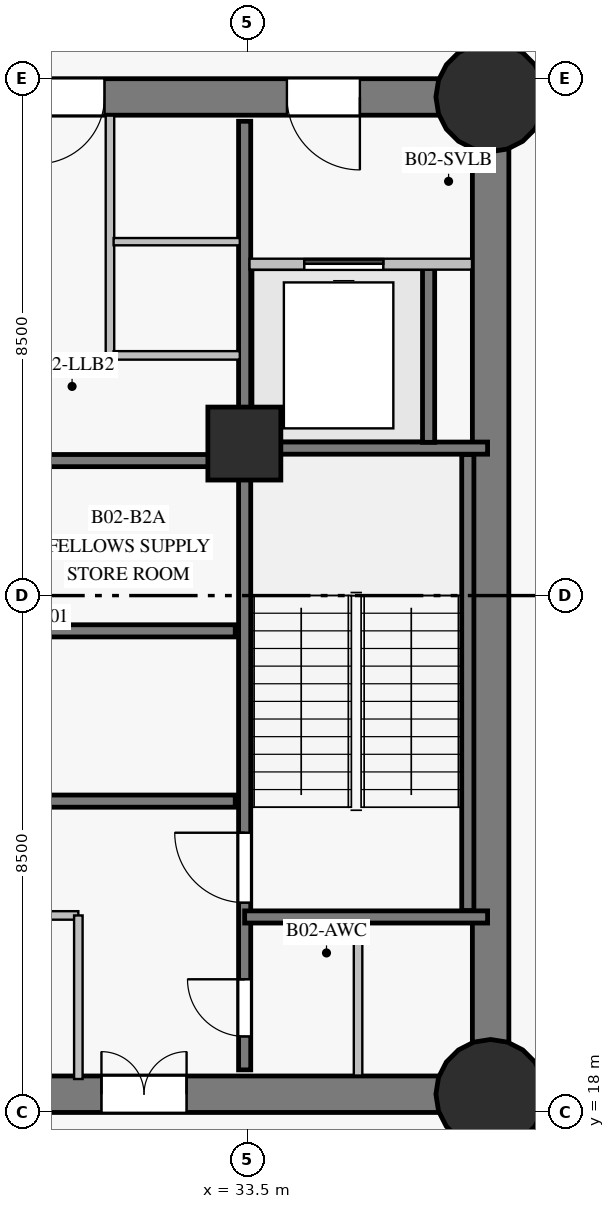
"""IFC4 building model, lengths in metres.
Left out: names, types, materials, properties, quantities, classifications, styles, units other than length and angle.
Written with IfcOpenShell. Run it as: python <this file> out.ifc"""

import sys

from ifc_helpers import new_model, si_unit, direction, frame, frame_2d, origin, origin_with_axes, origin_2d, place, context, subcontext, project, spatial, rectangle, circle, extrude, source, transform, mapped, element, fill, save


model = new_model("IFC4")
c1 = context("Model", 3, precision=1e-05, world=origin(), true_north=direction((0.0, 1.0)))
c2 = subcontext(c1, "Body", "Model", "MODEL_VIEW")
j1 = project(units=[si_unit("LENGTHUNIT", "METRE"), si_unit("PLANEANGLEUNIT", "RADIAN")], contexts=[c1])
p1 = place(None, origin())
s1 = spatial("IfcSite", under=j1, at=p1, CompositionType="ELEMENT")
p2 = place(p1, origin())
s2 = spatial("IfcBuilding", under=s1, at=p2, CompositionType="ELEMENT")
p3 = place(p2, frame((0.0, 0.0, -8.4)))
s3 = spatial("IfcBuildingStorey", under=s2, at=p3, CompositionType="ELEMENT", Elevation=-8.4)
p4 = place(p3, frame((26.55, 18.3, 0.0), z_axis=(0.0, 0.0, 1.0), x_axis=(1.0, 0.0, 0.0)))
e1 = element("IfcWall", 1, at=p4, inside=s3, PredefinedType="SHEAR", context=c2, shape_type="SweptSolid", body=[
    extrude(rectangle(XDim=10.95, YDim=0.6, at=frame_2d((5.475, 0.0))), origin(), (0.0, 0.0, 1.0), 3.85),
])
p5 = place(p4, frame((4.55, 0.0, 0.0)))
e2 = element("IfcOpeningElement", 2, at=p5, cuts=e1, PredefinedType="OPENING", context=c2, shape_type="SweptSolid", body=[
    extrude(rectangle(XDim=1.4, YDim=2.2, at=frame_2d((0.7, 1.1))), frame((0.0, 0.31, 0.0), z_axis=(0.0, -1.0, 0.0), x_axis=(1.0, 0.0, 0.0)), (0.0, 0.0, 1.0), 0.62),
])
p6 = place(p3, frame((37.5, 18.3, 0.0), z_axis=(0.0, 0.0, 1.0), x_axis=(0.0, 1.0, 0.0)))
e3 = element("IfcWall", 3, at=p6, inside=s3, PredefinedType="SHEAR", context=c2, shape_type="SweptSolid", body=[
    extrude(rectangle(XDim=16.4, YDim=0.6, at=frame_2d((8.2, 0.0))), origin(), (0.0, 0.0, 1.0), 3.85),
])
p7 = place(p3, frame((37.5, 34.7, 0.0), z_axis=(0.0, 0.0, 1.0), x_axis=(-1.0, 0.0, 0.0)))
e4 = element("IfcWall", 4, at=p7, inside=s3, PredefinedType="SHEAR", context=c2, shape_type="SweptSolid", body=[
    extrude(rectangle(XDim=10.95, YDim=0.6, at=frame_2d((5.475, 0.0))), origin(), (0.0, 0.0, 1.0), 3.85),
])
p8 = place(p7, frame((2.15, 0.0, 0.0)))
e5 = element("IfcOpeningElement", 5, at=p8, cuts=e4, PredefinedType="OPENING", context=c2, shape_type="SweptSolid", body=[
    extrude(rectangle(XDim=1.2, YDim=2.15, at=frame_2d((0.6, 1.075))), frame((0.0, 0.31, 0.0), z_axis=(0.0, -1.0, 0.0), x_axis=(1.0, 0.0, 0.0)), (0.0, 0.0, 1.0), 0.62),
])
p9 = place(p7, frame((6.35, 0.0, 0.0)))
e6 = element("IfcOpeningElement", 6, at=p9, cuts=e4, PredefinedType="OPENING", context=c2, shape_type="SweptSolid", body=[
    extrude(rectangle(XDim=1.1, YDim=2.15, at=frame_2d((0.55, 1.075))), frame((0.0, 0.31, 0.0), z_axis=(0.0, -1.0, 0.0), x_axis=(1.0, 0.0, 0.0)), (0.0, 0.0, 1.0), 0.62),
])
m1 = source(origin_with_axes(), c2, "Body", "SweptSolid", [
    extrude(circle(Radius=0.9, at=origin_2d()), origin(), (0.0, 0.0, 1.0), 4.2),
])
for number, where, z_axis, x_axis in (
    (7, (37.5, 18.3, 0.0), (0.0, 0.0, 1.0), (1.0, 0.0, 0.0)),
    (8, (37.5, 34.7, 0.0), (0.0, 0.0, 1.0), (1.0, 0.0, 0.0)),
):
    element("IfcColumn", number, at=place(p3, frame(where, z_axis=z_axis, x_axis=x_axis)), inside=s3, PredefinedType="COLUMN", context=c2, shape_type="MappedRepresentation", body=[
        mapped(m1, transform((0.0, 0.0, 0.0), scale=1.0)),
    ])
m2 = source(origin_with_axes(), c2, "Body", "SweptSolid", [
    extrude(rectangle(XDim=1.2, YDim=1.2, at=origin_2d()), origin(), (0.0, 0.0, 1.0), 4.2),
])
p10 = place(p3, frame((33.45, 29.0, 0.0), z_axis=(0.0, 0.0, 1.0), x_axis=(1.0, 0.0, 0.0)))
e9 = element("IfcColumn", 9, at=p10, inside=s3, PredefinedType="COLUMN", context=c2, shape_type="MappedRepresentation", body=[
    mapped(m2, transform((0.0, 0.0, 0.0), scale=1.0)),
])
p11 = place(p3, frame((33.455, 18.7, 0.0), z_axis=(0.0, 0.0, 1.0), x_axis=(0.0, 1.0, 0.0)))
e10 = element("IfcWall", 10, at=p11, inside=s3, PredefinedType="SHEAR", context=c2, shape_type="SweptSolid", body=[
    extrude(rectangle(XDim=15.6, YDim=0.2, at=frame_2d((7.8, 0.0))), origin(), (0.0, 0.0, 1.0), 3.85),
])
p12 = place(p11, frame((2.75, 0.0, 0.0)))
e11 = element("IfcOpeningElement", 11, at=p12, cuts=e10, PredefinedType="OPENING", context=c2, shape_type="SweptSolid", body=[
    extrude(rectangle(XDim=1.15, YDim=2.15, at=frame_2d((0.575, 1.075))), frame((0.0, 0.11, 0.0), z_axis=(0.0, -1.0, 0.0), x_axis=(1.0, 0.0, 0.0)), (0.0, 0.0, 1.0), 0.22),
])
p13 = place(p11, frame((0.55, 0.0, 0.0)))
e12 = element("IfcOpeningElement", 12, at=p13, cuts=e10, PredefinedType="OPENING", context=c2, shape_type="SweptSolid", body=[
    extrude(rectangle(XDim=0.94, YDim=2.1, at=frame_2d((0.47, 1.05))), frame((0.0, 0.11, 0.0), z_axis=(0.0, -1.0, 0.0), x_axis=(1.0, 0.0, 0.0)), (0.0, 0.0, 1.0), 0.22),
])
p14 = place(p3, frame((23.7, 23.12, 0.0), z_axis=(0.0, 0.0, 1.0), x_axis=(1.0, 0.0, 0.0)))
e13 = element("IfcWall", 13, at=p14, inside=s3, PredefinedType="SHEAR", context=c2, shape_type="SweptSolid", body=[
    extrude(rectangle(XDim=9.6, YDim=0.2, at=frame_2d((4.8, 0.0))), origin(), (0.0, 0.0, 1.0), 3.85),
])
p15 = place(p14, frame((4.2, 0.0, 0.0)))
e14 = element("IfcOpeningElement", 14, at=p15, cuts=e13, PredefinedType="OPENING", context=c2, shape_type="SweptSolid", body=[
    extrude(rectangle(XDim=1.0, YDim=2.15, at=frame_2d((0.5, 1.075))), frame((0.0, 0.11, 0.0), z_axis=(0.0, -1.0, 0.0), x_axis=(1.0, 0.0, 0.0)), (0.0, 0.0, 1.0), 0.22),
])
p16 = place(p3, frame((23.7, 25.92, 0.0), z_axis=(0.0, 0.0, 1.0), x_axis=(1.0, 0.0, 0.0)))
e15 = element("IfcWall", 15, at=p16, inside=s3, PredefinedType="SHEAR", context=c2, shape_type="SweptSolid", body=[
    extrude(rectangle(XDim=9.6, YDim=0.2, at=frame_2d((4.8, 0.0))), origin(), (0.0, 0.0, 1.0), 3.85),
])
p17 = place(p3, frame((23.7, 28.72, 0.0), z_axis=(0.0, 0.0, 1.0), x_axis=(1.0, 0.0, 0.0)))
e16 = element("IfcWall", 16, at=p17, inside=s3, PredefinedType="SHEAR", context=c2, shape_type="SweptSolid", body=[
    extrude(rectangle(XDim=9.6, YDim=0.2, at=frame_2d((4.8, 0.0))), origin(), (0.0, 0.0, 1.0), 3.85),
])
p18 = place(p17, frame((4.2, 0.0, 0.0)))
e17 = element("IfcOpeningElement", 17, at=p18, cuts=e16, PredefinedType="OPENING", context=c2, shape_type="SweptSolid", body=[
    extrude(rectangle(XDim=1.0, YDim=2.15, at=frame_2d((0.5, 1.075))), frame((0.0, 0.11, 0.0), z_axis=(0.0, -1.0, 0.0), x_axis=(1.0, 0.0, 0.0)), (0.0, 0.0, 1.0), 0.22),
])
p19 = place(p3, frame((37.125, 21.32, 0.0), z_axis=(0.0, 0.0, 1.0), x_axis=(0.0, 1.0, 0.0)))
e18 = element("IfcWall", 18, at=p19, inside=s3, PredefinedType="SHEAR", context=c2, shape_type="SweptSolid", body=[
    extrude(rectangle(XDim=7.5, YDim=0.2, at=frame_2d((3.75, 0.0))), origin(), (0.0, 0.0, 1.0), 3.85),
])
for number, where, z_axis, x_axis in (
    (19, (33.455, 21.215, 0.0), (0.0, 0.0, 1.0), (1.0, 0.0, 0.0)),
    (20, (33.455, 28.925, 0.0), (0.0, 0.0, 1.0), (1.0, 0.0, 0.0)),
):
    element("IfcWall", number, at=place(p3, frame(where, z_axis=z_axis, x_axis=x_axis)), inside=s3, PredefinedType="SHEAR", context=c2, shape_type="SweptSolid", body=[
        extrude(rectangle(XDim=3.995, YDim=0.2, at=frame_2d((1.998, 0.0))), origin(), (0.0, 0.0, 1.0), 3.85),
    ])
p20 = place(p3, frame((36.48, 29.02, 0.0), z_axis=(0.0, 0.0, 1.0), x_axis=(0.0, 1.0, 0.0)))
e21 = element("IfcWall", 21, at=p20, inside=s3, PredefinedType="SHEAR", context=c2, shape_type="SweptSolid", body=[
    extrude(rectangle(XDim=2.86, YDim=0.2, at=frame_2d((1.43, 0.0))), origin(), (0.0, 0.0, 1.0), 3.85),
])
p21 = place(p3, frame((31.24, 30.45, 0.0), z_axis=(0.0, 0.0, 1.0), x_axis=(0.0, 1.0, 0.0)))
e22 = element("IfcWall", 22, at=p21, inside=s3, PredefinedType="PARTITIONING", context=c2, shape_type="SweptSolid", body=[
    extrude(rectangle(XDim=3.943, YDim=0.14, at=frame_2d((1.972, 0.0))), origin(), (0.0, 0.0, 1.0), 3.85),
])
p22 = place(p3, frame((33.535, 31.95, 0.0), z_axis=(0.0, 0.0, 1.0), x_axis=(1.0, 0.0, 0.0)))
e23 = element("IfcWall", 23, at=p22, inside=s3, PredefinedType="PARTITIONING", context=c2, shape_type="SweptSolid", body=[
    extrude(rectangle(XDim=3.658, YDim=0.18, at=frame_2d((1.829, 0.0))), origin(), (0.0, 0.0, 1.0), 3.85),
])
p23 = place(p22, frame((0.9, 0.0, 0.0)))
e24 = element("IfcOpeningElement", 24, at=p23, cuts=e23, PredefinedType="OPENING", context=c2, shape_type="SweptSolid", body=[
    extrude(rectangle(XDim=1.3, YDim=2.2, at=frame_2d((0.65, 1.1))), frame((0.0, 0.1, 0.0), z_axis=(0.0, -1.0, 0.0), x_axis=(1.0, 0.0, 0.0)), (0.0, 0.0, 1.0), 0.2),
])
p24 = place(p3, frame((27.28, 21.24, 0.0), z_axis=(0.0, 0.0, 1.0), x_axis=(1.0, 0.0, 0.0)))
e25 = element("IfcWall", 25, at=p24, inside=s3, PredefinedType="PARTITIONING", context=c2, shape_type="SweptSolid", body=[
    extrude(rectangle(XDim=3.44, YDim=0.14, at=frame_2d((1.72, 0.0))), origin(), (0.0, 0.0, 1.0), 3.85),
])
p25 = place(p24, frame((1.15, 0.0, 0.0)))
e26 = element("IfcOpeningElement", 26, at=p25, cuts=e25, PredefinedType="OPENING", context=c2, shape_type="SweptSolid", body=[
    extrude(rectangle(XDim=0.92, YDim=2.1, at=frame_2d((0.46, 1.05))), frame((0.0, 0.08, 0.0), z_axis=(0.0, -1.0, 0.0), x_axis=(1.0, 0.0, 0.0)), (0.0, 0.0, 1.0), 0.16),
])
p26 = place(p3, frame((30.72, 18.55, 0.0), z_axis=(0.0, 0.0, 1.0), x_axis=(0.0, 1.0, 0.0)))
e27 = element("IfcWall", 27, at=p26, inside=s3, PredefinedType="PARTITIONING", context=c2, shape_type="SweptSolid", body=[
    extrude(rectangle(XDim=2.69, YDim=0.14, at=frame_2d((1.345, 0.0))), origin(), (0.0, 0.0, 1.0), 3.85),
])
p27 = place(p3, frame((35.32, 18.607, 0.0), z_axis=(0.0, 0.0, 1.0), x_axis=(0.0, 1.0, 0.0)))
e28 = element("IfcWall", 28, at=p27, inside=s3, PredefinedType="PARTITIONING", context=c2, shape_type="SweptSolid", body=[
    extrude(rectangle(XDim=2.503, YDim=0.14, at=frame_2d((1.251, 0.0))), origin(), (0.0, 0.0, 1.0), 3.85),
])
p28 = place(p3, frame((31.3, 30.45, 0.0), z_axis=(0.0, 0.0, 1.0), x_axis=(1.0, 0.0, 0.0)))
e29 = element("IfcWall", 29, at=p28, inside=s3, PredefinedType="PARTITIONING", context=c2, shape_type="SweptSolid", body=[
    extrude(rectangle(XDim=2.075, YDim=0.14, at=frame_2d((1.038, 0.0))), origin(), (0.0, 0.0, 1.0), 3.85),
])
p29 = place(p3, frame((31.3, 32.32, 0.0), z_axis=(0.0, 0.0, 1.0), x_axis=(1.0, 0.0, 0.0)))
e30 = element("IfcWall", 30, at=p29, inside=s3, PredefinedType="PARTITIONING", context=c2, shape_type="SweptSolid", body=[
    extrude(rectangle(XDim=2.075, YDim=0.12, at=frame_2d((1.038, 0.0))), origin(), (0.0, 0.0, 1.0), 3.85),
])
m3 = source(origin_with_axes(), c2, "Body", "SweptSolid", [
    extrude(rectangle(XDim=1.15, YDim=2.15, at=frame_2d((0.575, 1.075))), frame((0.0, 0.025, 0.0), z_axis=(0.0, -1.0, 0.0), x_axis=(1.0, 0.0, 0.0)), (0.0, 0.0, 1.0), 0.05),
])
p30 = place(p12, origin())
e31 = element("IfcDoor", 31, at=p30, inside=s3, OperationType="SINGLE_SWING_RIGHT", PredefinedType="DOOR", context=c2, shape_type="MappedRepresentation", body=[
    mapped(m3, transform((0.0, 0.0, 0.0), scale=1.0)),
])
fill(e11, e31)
m4 = source(origin_with_axes(), c2, "Body", "SweptSolid", [
    extrude(rectangle(XDim=1.2, YDim=2.15, at=frame_2d((0.6, 1.075))), frame((0.0, 0.025, 0.0), z_axis=(0.0, -1.0, 0.0), x_axis=(1.0, 0.0, 0.0)), (0.0, 0.0, 1.0), 0.05),
])
p31 = place(p8, origin())
e32 = element("IfcDoor", 32, at=p31, inside=s3, OperationType="SINGLE_SWING_LEFT", PredefinedType="DOOR", context=c2, shape_type="MappedRepresentation", body=[
    mapped(m4, transform((0.0, 0.0, 0.0), scale=1.0)),
])
fill(e5, e32)
m5 = source(origin_with_axes(), c2, "Body", "SweptSolid", [
    extrude(rectangle(XDim=1.3, YDim=2.2, at=frame_2d((0.65, 1.1))), frame((0.0, 0.025, 0.0), z_axis=(0.0, -1.0, 0.0), x_axis=(1.0, 0.0, 0.0)), (0.0, 0.0, 1.0), 0.05),
])
p32 = place(p23, origin())
e33 = element("IfcDoor", 33, at=p32, inside=s3, OperationType="SLIDING_TO_LEFT", PredefinedType="DOOR", context=c2, shape_type="MappedRepresentation", body=[
    mapped(m5, transform((0.0, 0.0, 0.0), scale=1.0)),
])
fill(e24, e33)
m6 = source(origin_with_axes(), c2, "Body", "SweptSolid", [
    extrude(rectangle(XDim=1.4, YDim=2.2, at=frame_2d((0.7, 1.1))), frame((0.0, 0.025, 0.0), z_axis=(0.0, -1.0, 0.0), x_axis=(1.0, 0.0, 0.0)), (0.0, 0.0, 1.0), 0.05),
])
p33 = place(p5, origin())
e34 = element("IfcDoor", 34, at=p33, inside=s3, OperationType="DOUBLE_DOOR_SINGLE_SWING", PredefinedType="DOOR", context=c2, shape_type="MappedRepresentation", body=[
    mapped(m6, transform((0.0, 0.0, 0.0), scale=1.0)),
])
fill(e2, e34)
m7 = source(origin_with_axes(), c2, "Body", "SweptSolid", [
    extrude(rectangle(XDim=0.94, YDim=2.1, at=frame_2d((0.47, 1.05))), frame((0.0, 0.025, 0.0), z_axis=(0.0, -1.0, 0.0), x_axis=(1.0, 0.0, 0.0)), (0.0, 0.0, 1.0), 0.05),
])
p34 = place(p13, origin())
e35 = element("IfcDoor", 35, at=p34, inside=s3, OperationType="SINGLE_SWING_RIGHT", PredefinedType="DOOR", context=c2, shape_type="MappedRepresentation", body=[
    mapped(m7, transform((0.0, 0.0, 0.0), scale=1.0)),
])
fill(e12, e35)
m8 = source(origin_with_axes(), c2, "Body", "SweptSolid", [
    extrude(rectangle(XDim=1.1, YDim=2.15, at=frame_2d((0.55, 1.075))), frame((0.0, 0.025, 0.0), z_axis=(0.0, -1.0, 0.0), x_axis=(1.0, 0.0, 0.0)), (0.0, 0.0, 1.0), 0.05),
])
p35 = place(p9, origin())
e36 = element("IfcDoor", 36, at=p35, inside=s3, OperationType="SINGLE_SWING_RIGHT", PredefinedType="DOOR", context=c2, shape_type="MappedRepresentation", body=[
    mapped(m8, transform((0.0, 0.0, 0.0), scale=1.0)),
])
fill(e6, e36)
save(model, sys.argv[1])
